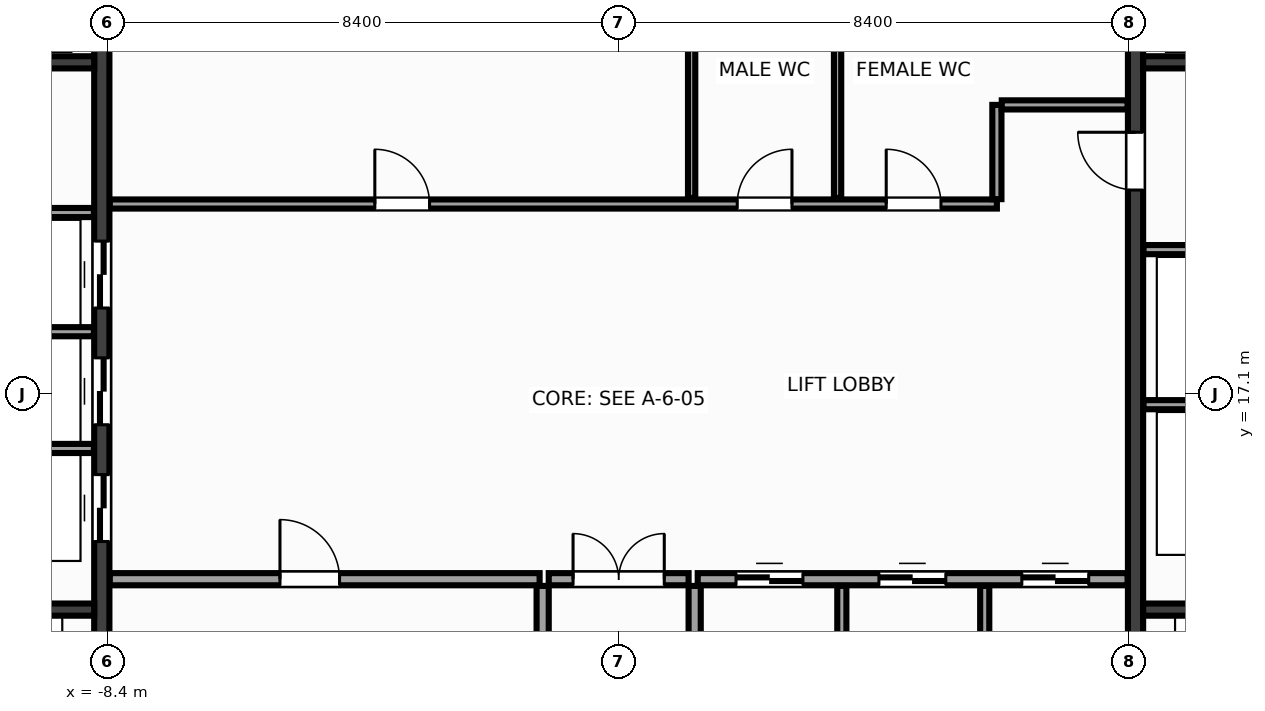
"""IFC4 building model, lengths in metres.
Left out: names, types, materials, properties, quantities, classifications, styles, units other than length and angle.
Written with IfcOpenShell. Run it as: python <this file> out.ifc"""

import sys

from ifc_helpers import new_model, si_unit, direction, frame, frame_2d, origin, place, context, subcontext, project, spatial, rectangle, extrude, source, transform, mapped, element, fill, save


model = new_model("IFC4")
c1 = context("Model", 3, precision=1e-05, world=origin(), true_north=direction((0.0, 1.0)))
c2 = subcontext(c1, "Body", "Model", "MODEL_VIEW")
j1 = project(units=[si_unit("LENGTHUNIT", "METRE"), si_unit("PLANEANGLEUNIT", "RADIAN")], contexts=[c1])
p1 = place(None, origin())
s1 = spatial("IfcSite", under=j1, at=p1, CompositionType="ELEMENT")
p2 = place(p1, origin())
s2 = spatial("IfcBuilding", under=s1, at=p2, CompositionType="ELEMENT")
p3 = place(p2, frame((0.0, 0.0, 174.8)))
s3 = spatial("IfcBuildingStorey", under=s2, at=p3, CompositionType="ELEMENT", Elevation=174.8)
m1 = source(origin(), c2, "Body", "SweptSolid", [
    extrude(rectangle(XDim=12.95, YDim=0.25, at=frame_2d((6.475, 0.0))), origin(), (0.0, 0.0, 1.0), 3.6),
])
p4 = place(p3, frame((-8.5, 10.525, 0.0), z_axis=(0.0, 0.0, 1.0), x_axis=(0.0, 1.0, 0.0)))
e1 = element("IfcWall", 1, at=p4, inside=s3, PredefinedType="SHEAR", context=c2, shape_type="MappedRepresentation", body=[
    mapped(m1, transform((0.0, 0.0, 0.0), x_axis=(1.0, 0.0, 0.0), y_axis=(0.0, 1.0, 0.0), z_axis=(0.0, 0.0, 1.0), scale=1.0)),
])
p5 = place(p4, frame((4.145, 0.0, 0.0)))
e2 = element("IfcOpeningElement", 2, at=p5, cuts=e1, PredefinedType="OPENING", context=c2, shape_type="SweptSolid", body=[
    extrude(rectangle(XDim=1.1, YDim=2.15, at=frame_2d((0.55, 1.075))), frame((0.0, 0.137, 0.0), z_axis=(0.0, -1.0, 0.0), x_axis=(1.0, 0.0, 0.0)), (0.0, 0.0, 1.0), 0.274),
])
p6 = place(p4, frame((6.065, 0.0, 0.0)))
e3 = element("IfcOpeningElement", 3, at=p6, cuts=e1, PredefinedType="OPENING", context=c2, shape_type="SweptSolid", body=[
    extrude(rectangle(XDim=1.1, YDim=2.15, at=frame_2d((0.55, 1.075))), frame((0.0, 0.137, 0.0), z_axis=(0.0, -1.0, 0.0), x_axis=(1.0, 0.0, 0.0)), (0.0, 0.0, 1.0), 0.274),
])
p7 = place(p4, frame((7.985, 0.0, 0.0)))
e4 = element("IfcOpeningElement", 4, at=p7, cuts=e1, PredefinedType="OPENING", context=c2, shape_type="SweptSolid", body=[
    extrude(rectangle(XDim=1.1, YDim=2.15, at=frame_2d((0.55, 1.075))), frame((0.0, 0.137, 0.0), z_axis=(0.0, -1.0, 0.0), x_axis=(1.0, 0.0, 0.0)), (0.0, 0.0, 1.0), 0.274),
])
p8 = place(p3, frame((8.5, 10.525, 0.0), z_axis=(0.0, 0.0, 1.0), x_axis=(0.0, 1.0, 0.0)))
e5 = element("IfcWall", 5, at=p8, inside=s3, PredefinedType="SHEAR", context=c2, shape_type="MappedRepresentation", body=[
    mapped(m1, transform((0.0, 0.0, 0.0), x_axis=(1.0, 0.0, 0.0), y_axis=(0.0, 1.0, 0.0), z_axis=(0.0, 0.0, 1.0), scale=1.0)),
])
p9 = place(p8, frame((9.925, 0.0, 0.0)))
e6 = element("IfcOpeningElement", 6, at=p9, cuts=e5, PredefinedType="OPENING", context=c2, shape_type="SweptSolid", body=[
    extrude(rectangle(XDim=0.95, YDim=2.15, at=frame_2d((0.475, 1.075))), frame((0.0, 0.137, 0.0), z_axis=(0.0, -1.0, 0.0), x_axis=(1.0, 0.0, 0.0)), (0.0, 0.0, 1.0), 0.274),
])
m2 = source(origin(), c2, "Body", "SweptSolid", [
    extrude(rectangle(XDim=2.825, YDim=0.2, at=frame_2d((1.413, 0.0))), origin(), (0.0, 0.0, 1.0), 3.6),
])
for number, where, z_axis, x_axis in (
    (7, (-11.45, 13.55, 0.0), (0.0, 0.0, 1.0), (1.0, 0.0, 0.0)),
    (8, (8.625, 13.55, 0.0), (0.0, 0.0, 1.0), (1.0, 0.0, 0.0)),
):
    element("IfcWall", number, at=place(p3, frame(where, z_axis=z_axis, x_axis=x_axis)), inside=s3, PredefinedType="SHEAR", context=c2, shape_type="MappedRepresentation", body=[
        mapped(m2, transform((0.0, 0.0, 0.0), x_axis=(1.0, 0.0, 0.0), y_axis=(0.0, 1.0, 0.0), z_axis=(0.0, 0.0, 1.0), scale=1.0)),
    ])
m3 = source(origin(), c2, "Body", "SweptSolid", [
    extrude(rectangle(XDim=3.02, YDim=0.2, at=frame_2d((1.51, 0.0))), origin(), (0.0, 0.0, 1.0), 3.6),
])
for number, where, z_axis, x_axis in (
    (9, (-11.645, 22.55, 0.0), (0.0, 0.0, 1.0), (1.0, 0.0, 0.0)),
    (10, (8.625, 22.55, 0.0), (0.0, 0.0, 1.0), (1.0, 0.0, 0.0)),
):
    element("IfcWall", number, at=place(p3, frame(where, z_axis=z_axis, x_axis=x_axis)), inside=s3, PredefinedType="SHEAR", context=c2, shape_type="MappedRepresentation", body=[
        mapped(m3, transform((0.0, 0.0, 0.0), x_axis=(1.0, 0.0, 0.0), y_axis=(0.0, 1.0, 0.0), z_axis=(0.0, 0.0, 1.0), scale=1.0)),
    ])
m4 = source(origin(), c2, "Body", "SweptSolid", [
    extrude(rectangle(XDim=3.01, YDim=0.15, at=frame_2d((1.505, 0.0))), origin(), (0.0, 0.0, 1.0), 3.38),
])
for number, where, z_axis, x_axis in (
    (11, (-11.64, 16.2, 0.0), (0.0, 0.0, 1.0), (1.0, 0.0, 0.0)),
    (12, (-11.64, 18.12, 0.0), (0.0, 0.0, 1.0), (1.0, 0.0, 0.0)),
    (13, (-11.64, 20.08, 0.0), (0.0, 0.0, 1.0), (1.0, 0.0, 0.0)),
    (14, (8.63, 16.92, 0.0), (0.0, 0.0, 1.0), (1.0, 0.0, 0.0)),
    (15, (8.63, 19.47, 0.0), (0.0, 0.0, 1.0), (1.0, 0.0, 0.0)),
):
    element("IfcWall", number, at=place(p3, frame(where, z_axis=z_axis, x_axis=x_axis)), inside=s3, PredefinedType="PARTITIONING", context=c2, shape_type="MappedRepresentation", body=[
        mapped(m4, transform((0.0, 0.0, 0.0), x_axis=(1.0, 0.0, 0.0), y_axis=(0.0, 1.0, 0.0), z_axis=(0.0, 0.0, 1.0), scale=1.0)),
    ])
m5 = source(origin(), c2, "Body", "SweptSolid", [
    extrude(rectangle(XDim=7.07, YDim=0.2, at=frame_2d((3.535, 0.0))), origin(), (0.0, 0.0, 1.0), 3.38),
])
p10 = place(p3, frame((-8.37, 14.05, 0.0), z_axis=(0.0, 0.0, 1.0), x_axis=(1.0, 0.0, 0.0)))
e16 = element("IfcWall", 16, at=p10, inside=s3, PredefinedType="PARTITIONING", context=c2, shape_type="MappedRepresentation", body=[
    mapped(m5, transform((0.0, 0.0, 0.0), x_axis=(1.0, 0.0, 0.0), y_axis=(0.0, 1.0, 0.0), z_axis=(0.0, 0.0, 1.0), scale=1.0)),
])
p11 = place(p10, frame((2.8, 0.0, 0.0)))
e17 = element("IfcOpeningElement", 17, at=p11, cuts=e16, PredefinedType="OPENING", context=c2, shape_type="SweptSolid", body=[
    extrude(rectangle(XDim=0.98, YDim=2.15, at=frame_2d((0.49, 1.075))), frame((0.0, 0.112, 0.0), z_axis=(0.0, -1.0, 0.0), x_axis=(1.0, 0.0, 0.0)), (0.0, 0.0, 1.0), 0.224),
])
p12 = place(p3, frame((1.3, 14.05, 0.0), z_axis=(0.0, 0.0, 1.0), x_axis=(1.0, 0.0, 0.0)))
e18 = element("IfcWall", 18, at=p12, inside=s3, PredefinedType="PARTITIONING", context=c2, shape_type="MappedRepresentation", body=[
    mapped(m5, transform((0.0, 0.0, 0.0), x_axis=(1.0, 0.0, 0.0), y_axis=(0.0, 1.0, 0.0), z_axis=(0.0, 0.0, 1.0), scale=1.0)),
])
p13 = place(p12, frame((0.63, 0.0, 0.0)))
e19 = element("IfcOpeningElement", 19, at=p13, cuts=e18, PredefinedType="OPENING", context=c2, shape_type="SweptSolid", body=[
    extrude(rectangle(XDim=1.1, YDim=2.15, at=frame_2d((0.55, 1.075))), frame((0.0, 0.112, 0.0), z_axis=(0.0, -1.0, 0.0), x_axis=(1.0, 0.0, 0.0)), (0.0, 0.0, 1.0), 0.224),
])
p14 = place(p12, frame((2.98, 0.0, 0.0)))
e20 = element("IfcOpeningElement", 20, at=p14, cuts=e18, PredefinedType="OPENING", context=c2, shape_type="SweptSolid", body=[
    extrude(rectangle(XDim=1.1, YDim=2.15, at=frame_2d((0.55, 1.075))), frame((0.0, 0.112, 0.0), z_axis=(0.0, -1.0, 0.0), x_axis=(1.0, 0.0, 0.0)), (0.0, 0.0, 1.0), 0.224),
])
p15 = place(p12, frame((5.33, 0.0, 0.0)))
e21 = element("IfcOpeningElement", 21, at=p15, cuts=e18, PredefinedType="OPENING", context=c2, shape_type="SweptSolid", body=[
    extrude(rectangle(XDim=1.1, YDim=2.15, at=frame_2d((0.55, 1.075))), frame((0.0, 0.112, 0.0), z_axis=(0.0, -1.0, 0.0), x_axis=(1.0, 0.0, 0.0)), (0.0, 0.0, 1.0), 0.224),
])
m6 = source(origin(), c2, "Body", "SweptSolid", [
    extrude(rectangle(XDim=3.415, YDim=0.2, at=frame_2d((1.708, 0.0))), origin(), (0.0, 0.0, 1.0), 3.38),
])
for number, where, z_axis, x_axis in (
    (22, (-1.25, 10.525, 0.0), (0.0, 0.0, 1.0), (0.0, 1.0, 0.0)),
    (23, (1.25, 10.525, 0.0), (0.0, 0.0, 1.0), (0.0, 1.0, 0.0)),
):
    element("IfcWall", number, at=place(p3, frame(where, z_axis=z_axis, x_axis=x_axis)), inside=s3, PredefinedType="PARTITIONING", context=c2, shape_type="MappedRepresentation", body=[
        mapped(m6, transform((0.0, 0.0, 0.0), x_axis=(1.0, 0.0, 0.0), y_axis=(0.0, 1.0, 0.0), z_axis=(0.0, 0.0, 1.0), scale=1.0)),
    ])
m7 = source(origin(), c2, "Body", "SweptSolid", [
    extrude(rectangle(XDim=2.3, YDim=0.2, at=frame_2d((1.15, 0.0))), origin(), (0.0, 0.0, 1.0), 3.38),
])
p16 = place(p3, frame((-1.15, 14.05, 0.0), z_axis=(0.0, 0.0, 1.0), x_axis=(1.0, 0.0, 0.0)))
e24 = element("IfcWall", 24, at=p16, inside=s3, PredefinedType="PARTITIONING", context=c2, shape_type="MappedRepresentation", body=[
    mapped(m7, transform((0.0, 0.0, 0.0), x_axis=(1.0, 0.0, 0.0), y_axis=(0.0, 1.0, 0.0), z_axis=(0.0, 0.0, 1.0), scale=1.0)),
])
p17 = place(p16, frame((0.4, 0.0, 0.0)))
e25 = element("IfcOpeningElement", 25, at=p17, cuts=e24, PredefinedType="OPENING", context=c2, shape_type="SweptSolid", body=[
    extrude(rectangle(XDim=1.5, YDim=2.2, at=frame_2d((0.75, 1.1))), frame((0.0, 0.112, 0.0), z_axis=(0.0, -1.0, 0.0), x_axis=(1.0, 0.0, 0.0)), (0.0, 0.0, 1.0), 0.224),
])
m8 = source(origin(), c2, "Body", "SweptSolid", [
    extrude(rectangle(XDim=14.59, YDim=0.15, at=frame_2d((7.295, 0.0))), origin(), (0.0, 0.0, 1.0), 3.38),
])
p18 = place(p3, frame((-8.37, 20.22, 0.0), z_axis=(0.0, 0.0, 1.0), x_axis=(1.0, 0.0, 0.0)))
e26 = element("IfcWall", 26, at=p18, inside=s3, PredefinedType="PARTITIONING", context=c2, shape_type="MappedRepresentation", body=[
    mapped(m8, transform((0.0, 0.0, 0.0), x_axis=(1.0, 0.0, 0.0), y_axis=(0.0, 1.0, 0.0), z_axis=(0.0, 0.0, 1.0), scale=1.0)),
])
p19 = place(p18, frame((4.36, 0.0, 0.0)))
e27 = element("IfcOpeningElement", 27, at=p19, cuts=e26, PredefinedType="OPENING", context=c2, shape_type="SweptSolid", body=[
    extrude(rectangle(XDim=0.9, YDim=2.15, at=frame_2d((0.45, 1.075))), frame((0.0, 0.087, 0.0), z_axis=(0.0, -1.0, 0.0), x_axis=(1.0, 0.0, 0.0)), (0.0, 0.0, 1.0), 0.174),
])
p20 = place(p18, frame((10.32, 0.0, 0.0)))
e28 = element("IfcOpeningElement", 28, at=p20, cuts=e26, PredefinedType="OPENING", context=c2, shape_type="SweptSolid", body=[
    extrude(rectangle(XDim=0.9, YDim=2.15, at=frame_2d((0.45, 1.075))), frame((0.0, 0.087, 0.0), z_axis=(0.0, -1.0, 0.0), x_axis=(1.0, 0.0, 0.0)), (0.0, 0.0, 1.0), 0.174),
])
p21 = place(p18, frame((12.77, 0.0, 0.0)))
e29 = element("IfcOpeningElement", 29, at=p21, cuts=e26, PredefinedType="OPENING", context=c2, shape_type="SweptSolid", body=[
    extrude(rectangle(XDim=0.9, YDim=2.15, at=frame_2d((0.45, 1.075))), frame((0.0, 0.087, 0.0), z_axis=(0.0, -1.0, 0.0), x_axis=(1.0, 0.0, 0.0)), (0.0, 0.0, 1.0), 0.174),
])
m9 = source(origin(), c2, "Body", "SweptSolid", [
    extrude(rectangle(XDim=1.55, YDim=0.15, at=frame_2d((0.775, 0.0))), origin(), (0.0, 0.0, 1.0), 3.38),
])
p22 = place(p3, frame((6.22, 20.3, 0.0), z_axis=(0.0, 0.0, 1.0), x_axis=(0.0, 1.0, 0.0)))
e30 = element("IfcWall", 30, at=p22, inside=s3, PredefinedType="PARTITIONING", context=c2, shape_type="MappedRepresentation", body=[
    mapped(m9, transform((0.0, 0.0, 0.0), x_axis=(1.0, 0.0, 0.0), y_axis=(0.0, 1.0, 0.0), z_axis=(0.0, 0.0, 1.0), scale=1.0)),
])
m10 = source(origin(), c2, "Body", "SweptSolid", [
    extrude(rectangle(XDim=2.07, YDim=0.15, at=frame_2d((1.035, 0.0))), origin(), (0.0, 0.0, 1.0), 3.38),
])
p23 = place(p3, frame((6.3, 21.85, 0.0), z_axis=(0.0, 0.0, 1.0), x_axis=(1.0, 0.0, 0.0)))
e31 = element("IfcWall", 31, at=p23, inside=s3, PredefinedType="PARTITIONING", context=c2, shape_type="MappedRepresentation", body=[
    mapped(m10, transform((0.0, 0.0, 0.0), x_axis=(1.0, 0.0, 0.0), y_axis=(0.0, 1.0, 0.0), z_axis=(0.0, 0.0, 1.0), scale=1.0)),
])
m11 = source(origin(), c2, "Body", "SweptSolid", [
    extrude(rectangle(XDim=3.415, YDim=0.15, at=frame_2d((1.708, 0.0))), origin(), (0.0, 0.0, 1.0), 3.38),
])
for number, where, z_axis, x_axis in (
    (32, (3.67, 10.525, 0.0), (0.0, 0.0, 1.0), (0.0, 1.0, 0.0)),
    (33, (6.02, 10.525, 0.0), (0.0, 0.0, 1.0), (0.0, 1.0, 0.0)),
):
    element("IfcWall", number, at=place(p3, frame(where, z_axis=z_axis, x_axis=x_axis)), inside=s3, PredefinedType="PARTITIONING", context=c2, shape_type="MappedRepresentation", body=[
        mapped(m11, transform((0.0, 0.0, 0.0), x_axis=(1.0, 0.0, 0.0), y_axis=(0.0, 1.0, 0.0), z_axis=(0.0, 0.0, 1.0), scale=1.0)),
    ])
m12 = source(origin(), c2, "Body", "SweptSolid", [
    extrude(rectangle(XDim=3.115, YDim=0.12, at=frame_2d((1.558, 0.0))), origin(), (0.0, 0.0, 1.0), 3.38),
])
for number, where, z_axis, x_axis in (
    (34, (1.2, 20.32, 0.0), (0.0, 0.0, 1.0), (0.0, 1.0, 0.0)),
    (35, (3.6, 20.32, 0.0), (0.0, 0.0, 1.0), (0.0, 1.0, 0.0)),
):
    element("IfcWall", number, at=place(p3, frame(where, z_axis=z_axis, x_axis=x_axis)), inside=s3, PredefinedType="PARTITIONING", context=c2, shape_type="MappedRepresentation", body=[
        mapped(m12, transform((0.0, 0.0, 0.0), x_axis=(1.0, 0.0, 0.0), y_axis=(0.0, 1.0, 0.0), z_axis=(0.0, 0.0, 1.0), scale=1.0)),
    ])
m13 = source(origin(), c2, "Body", "SweptSolid", [
    extrude(rectangle(XDim=1.1, YDim=2.15, at=frame_2d((0.55, 1.075))), frame((0.0, 0.025, 0.0), z_axis=(0.0, -1.0, 0.0), x_axis=(1.0, 0.0, 0.0)), (0.0, 0.0, 1.0), 0.05),
])
p24 = place(p5, origin())
e36 = element("IfcDoor", 36, at=p24, inside=s3, OperationType="DOUBLE_DOOR_SLIDING", PredefinedType="DOOR", context=c2, shape_type="MappedRepresentation", body=[
    mapped(m13, transform((0.0, 0.0, 0.0), x_axis=(1.0, 0.0, 0.0), y_axis=(0.0, 1.0, 0.0), z_axis=(0.0, 0.0, 1.0), scale=1.0)),
])
fill(e2, e36)
p25 = place(p6, origin())
e37 = element("IfcDoor", 37, at=p25, inside=s3, OperationType="DOUBLE_DOOR_SLIDING", PredefinedType="DOOR", context=c2, shape_type="MappedRepresentation", body=[
    mapped(m13, transform((0.0, 0.0, 0.0), x_axis=(1.0, 0.0, 0.0), y_axis=(0.0, 1.0, 0.0), z_axis=(0.0, 0.0, 1.0), scale=1.0)),
])
fill(e3, e37)
p26 = place(p7, origin())
e38 = element("IfcDoor", 38, at=p26, inside=s3, OperationType="DOUBLE_DOOR_SLIDING", PredefinedType="DOOR", context=c2, shape_type="MappedRepresentation", body=[
    mapped(m13, transform((0.0, 0.0, 0.0), x_axis=(1.0, 0.0, 0.0), y_axis=(0.0, 1.0, 0.0), z_axis=(0.0, 0.0, 1.0), scale=1.0)),
])
fill(e4, e38)
m14 = source(origin(), c2, "Body", "SweptSolid", [
    extrude(rectangle(XDim=0.95, YDim=2.15, at=frame_2d((0.475, 1.075))), frame((0.0, 0.025, 0.0), z_axis=(0.0, -1.0, 0.0), x_axis=(1.0, 0.0, 0.0)), (0.0, 0.0, 1.0), 0.05),
])
p27 = place(p9, origin())
e39 = element("IfcDoor", 39, at=p27, inside=s3, OperationType="SINGLE_SWING_RIGHT", PredefinedType="DOOR", context=c2, shape_type="MappedRepresentation", body=[
    mapped(m14, transform((0.0, 0.0, 0.0), x_axis=(1.0, 0.0, 0.0), y_axis=(0.0, 1.0, 0.0), z_axis=(0.0, 0.0, 1.0), scale=1.0)),
])
fill(e6, e39)
m15 = source(origin(), c2, "Body", "SweptSolid", [
    extrude(rectangle(XDim=0.98, YDim=2.15, at=frame_2d((0.49, 1.075))), frame((0.0, 0.025, 0.0), z_axis=(0.0, -1.0, 0.0), x_axis=(1.0, 0.0, 0.0)), (0.0, 0.0, 1.0), 0.05),
])
p28 = place(p11, origin())
e40 = element("IfcDoor", 40, at=p28, inside=s3, OperationType="SINGLE_SWING_LEFT", PredefinedType="DOOR", context=c2, shape_type="MappedRepresentation", body=[
    mapped(m15, transform((0.0, 0.0, 0.0), x_axis=(1.0, 0.0, 0.0), y_axis=(0.0, 1.0, 0.0), z_axis=(0.0, 0.0, 1.0), scale=1.0)),
])
fill(e17, e40)
p29 = place(p13, origin())
e41 = element("IfcDoor", 41, at=p29, inside=s3, OperationType="DOUBLE_DOOR_SLIDING", PredefinedType="DOOR", context=c2, shape_type="MappedRepresentation", body=[
    mapped(m13, transform((0.0, 0.0, 0.0), x_axis=(1.0, 0.0, 0.0), y_axis=(0.0, 1.0, 0.0), z_axis=(0.0, 0.0, 1.0), scale=1.0)),
])
fill(e19, e41)
p30 = place(p14, origin())
e42 = element("IfcDoor", 42, at=p30, inside=s3, OperationType="DOUBLE_DOOR_SLIDING", PredefinedType="DOOR", context=c2, shape_type="MappedRepresentation", body=[
    mapped(m13, transform((0.0, 0.0, 0.0), x_axis=(1.0, 0.0, 0.0), y_axis=(0.0, 1.0, 0.0), z_axis=(0.0, 0.0, 1.0), scale=1.0)),
])
fill(e20, e42)
p31 = place(p15, origin())
e43 = element("IfcDoor", 43, at=p31, inside=s3, OperationType="DOUBLE_DOOR_SLIDING", PredefinedType="DOOR", context=c2, shape_type="MappedRepresentation", body=[
    mapped(m13, transform((0.0, 0.0, 0.0), x_axis=(1.0, 0.0, 0.0), y_axis=(0.0, 1.0, 0.0), z_axis=(0.0, 0.0, 1.0), scale=1.0)),
])
fill(e21, e43)
m16 = source(origin(), c2, "Body", "SweptSolid", [
    extrude(rectangle(XDim=1.5, YDim=2.2, at=frame_2d((0.75, 1.1))), frame((0.0, 0.025, 0.0), z_axis=(0.0, -1.0, 0.0), x_axis=(1.0, 0.0, 0.0)), (0.0, 0.0, 1.0), 0.05),
])
p32 = place(p17, origin())
e44 = element("IfcDoor", 44, at=p32, inside=s3, OperationType="DOUBLE_DOOR_SINGLE_SWING", PredefinedType="DOOR", context=c2, shape_type="MappedRepresentation", body=[
    mapped(m16, transform((0.0, 0.0, 0.0), x_axis=(1.0, 0.0, 0.0), y_axis=(0.0, 1.0, 0.0), z_axis=(0.0, 0.0, 1.0), scale=1.0)),
])
fill(e25, e44)
m17 = source(origin(), c2, "Body", "SweptSolid", [
    extrude(rectangle(XDim=0.9, YDim=2.15, at=frame_2d((0.45, 1.075))), frame((0.0, 0.025, 0.0), z_axis=(0.0, -1.0, 0.0), x_axis=(1.0, 0.0, 0.0)), (0.0, 0.0, 1.0), 0.05),
])
p33 = place(p19, origin())
e45 = element("IfcDoor", 45, at=p33, inside=s3, OperationType="SINGLE_SWING_LEFT", PredefinedType="DOOR", context=c2, shape_type="MappedRepresentation", body=[
    mapped(m17, transform((0.0, 0.0, 0.0), x_axis=(1.0, 0.0, 0.0), y_axis=(0.0, 1.0, 0.0), z_axis=(0.0, 0.0, 1.0), scale=1.0)),
])
fill(e27, e45)
p34 = place(p20, origin())
e46 = element("IfcDoor", 46, at=p34, inside=s3, OperationType="SINGLE_SWING_RIGHT", PredefinedType="DOOR", context=c2, shape_type="MappedRepresentation", body=[
    mapped(m17, transform((0.0, 0.0, 0.0), x_axis=(1.0, 0.0, 0.0), y_axis=(0.0, 1.0, 0.0), z_axis=(0.0, 0.0, 1.0), scale=1.0)),
])
fill(e28, e46)
p35 = place(p21, origin())
e47 = element("IfcDoor", 47, at=p35, inside=s3, OperationType="SINGLE_SWING_LEFT", PredefinedType="DOOR", context=c2, shape_type="MappedRepresentation", body=[
    mapped(m17, transform((0.0, 0.0, 0.0), x_axis=(1.0, 0.0, 0.0), y_axis=(0.0, 1.0, 0.0), z_axis=(0.0, 0.0, 1.0), scale=1.0)),
])
fill(e29, e47)
save(model, sys.argv[1])
